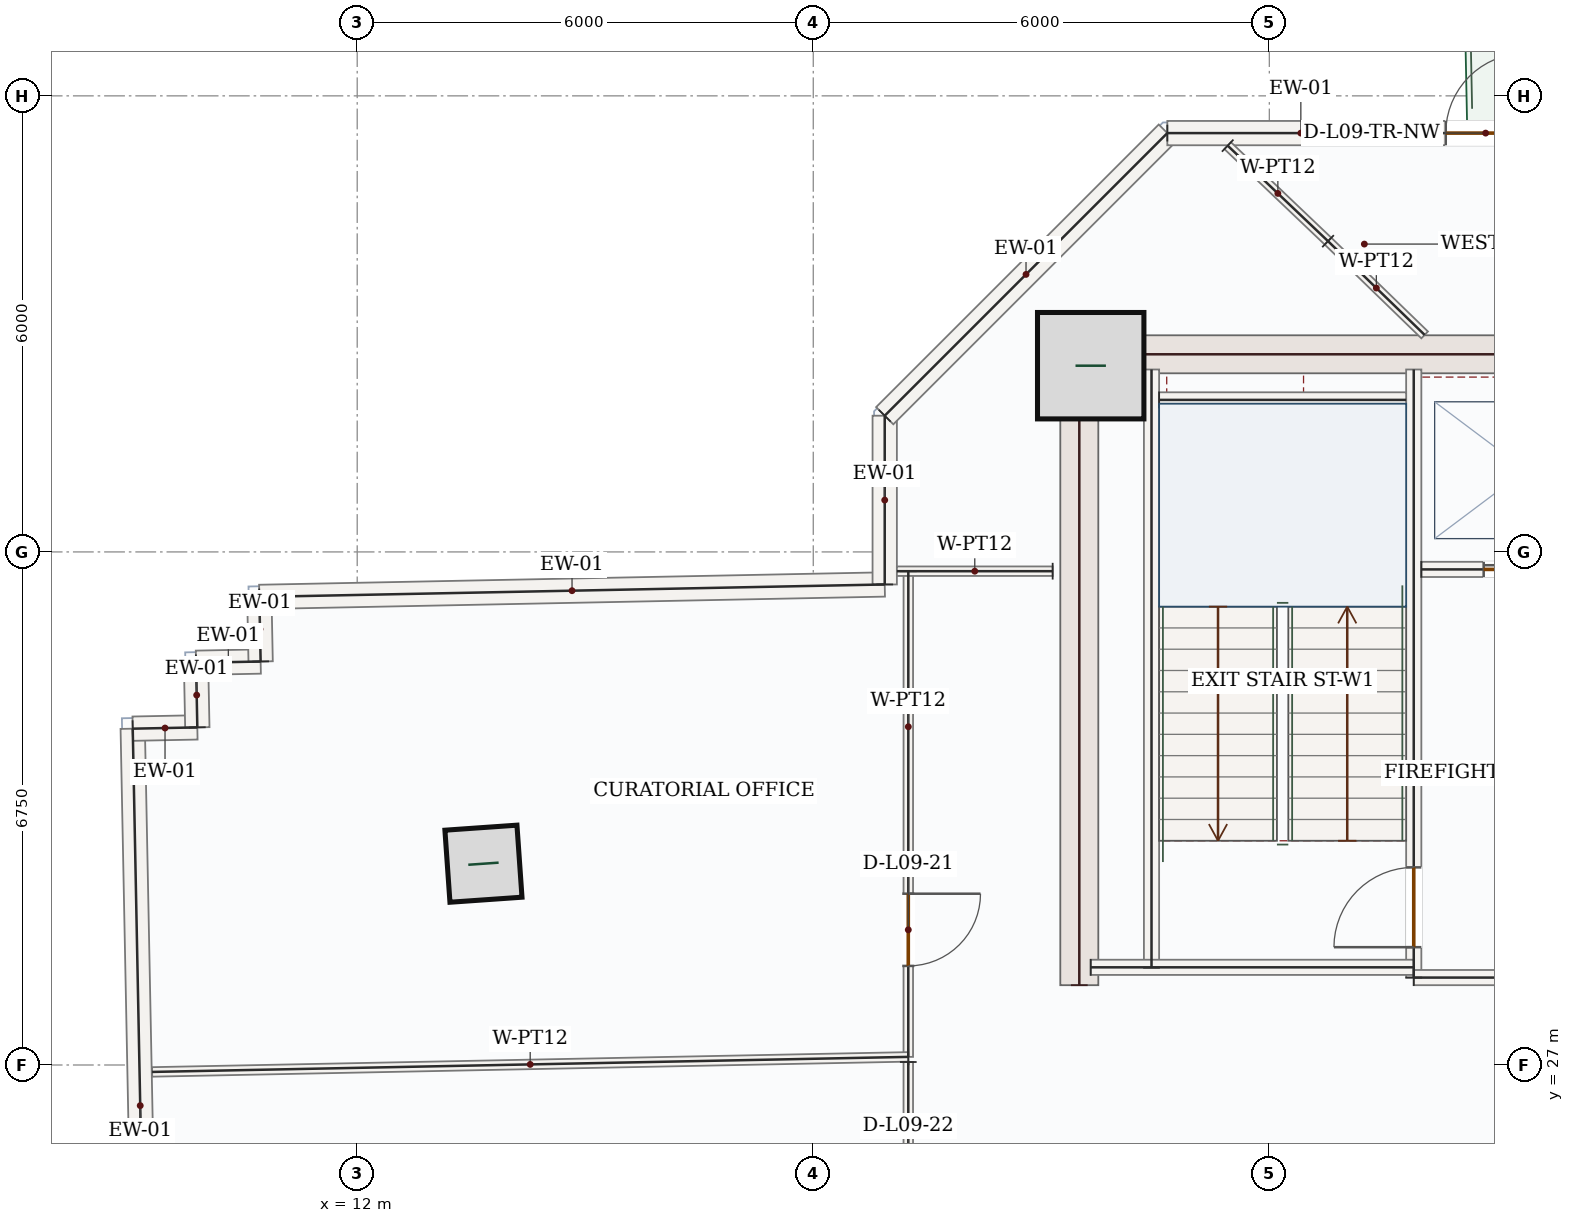
"""IFC4 building model, lengths in metres.
Left out: names, types, materials, properties, quantities, classifications, styles, units other than length and angle.
Written with IfcOpenShell. Run it as: python <this file> out.ifc"""

import sys

from ifc_helpers import new_model, si_unit, direction, frame, frame_2d, origin, origin_2d, place, context, subcontext, project, spatial, rectangle, hollow_rectangle, extrude, source, transform, mapped, element, fill, save


model = new_model("IFC4")
c1 = context("Model", 3, precision=1e-05, world=origin(), true_north=direction((0.0, 1.0)))
c2 = subcontext(c1, "Body", "Model", "MODEL_VIEW")
j1 = project(units=[si_unit("LENGTHUNIT", "METRE"), si_unit("PLANEANGLEUNIT", "RADIAN")], contexts=[c1])
p1 = place(None, origin())
s1 = spatial("IfcSite", under=j1, at=p1, CompositionType="ELEMENT")
p2 = place(p1, origin())
s2 = spatial("IfcBuilding", under=s1, at=p2, CompositionType="ELEMENT")
p3 = place(p2, frame((0.0, 0.0, 45.9)))
s3 = spatial("IfcBuildingStorey", under=s2, at=p3, CompositionType="ELEMENT", Elevation=45.9)
m1 = source(origin(), c2, "Body", "SweptSolid", [
    extrude(rectangle(XDim=8.55, YDim=0.5, at=frame_2d((4.275, 0.0))), origin(), (0.0, 0.0, 1.0), 3.95),
])
p4 = place(p3, frame((21.5, 28.05, 0.0), z_axis=(0.0, 0.0, 1.0), x_axis=(0.0, 1.0, 0.0)))
e1 = element("IfcWall", 1, at=p4, inside=s3, PredefinedType="SHEAR", context=c2, shape_type="MappedRepresentation", body=[
    mapped(m1, transform((0.0, 0.0, 0.0), x_axis=(1.0, 0.0, 0.0), y_axis=(0.0, 1.0, 0.0), z_axis=(0.0, 0.0, 1.0), scale=1.0)),
])
m2 = source(origin(), c2, "Body", "SweptSolid", [
    extrude(rectangle(XDim=7.0, YDim=0.5, at=frame_2d((3.5, 0.0))), origin(), (0.0, 0.0, 1.0), 3.95),
])
p5 = place(p3, frame((21.75, 36.35, 0.0), z_axis=(0.0, 0.0, 1.0), x_axis=(1.0, 0.0, 0.0)))
e2 = element("IfcWall", 2, at=p5, inside=s3, PredefinedType="SHEAR", context=c2, shape_type="MappedRepresentation", body=[
    mapped(m2, transform((0.0, 0.0, 0.0), x_axis=(1.0, 0.0, 0.0), y_axis=(0.0, 1.0, 0.0), z_axis=(0.0, 0.0, 1.0), scale=1.0)),
])
m3 = source(origin(), c2, "Body", "SweptSolid", [
    extrude(rectangle(XDim=1.4, YDim=1.4, at=origin_2d()), origin(), (0.0, 0.0, 1.0), 4.2),
])
p6 = place(p3, frame((21.65, 36.2, 0.0), z_axis=(0.0, 0.0, 1.0), x_axis=(1.0, 0.0, 0.0)))
e3 = element("IfcColumn", 3, at=p6, inside=s3, PredefinedType="COLUMN", context=c2, shape_type="MappedRepresentation", body=[
    mapped(m3, transform((0.0, 0.0, 0.0), x_axis=(1.0, 0.0, 0.0), y_axis=(0.0, 1.0, 0.0), z_axis=(0.0, 0.0, 1.0), scale=1.0)),
])
m4 = source(origin(), c2, "Body", "SweptSolid", [
    extrude(hollow_rectangle(XDim=0.95, YDim=0.95, WallThickness=0.05, at=origin_2d()), origin(), (0.0, 0.0, 1.0), 4.2),
])
p7 = place(p3, frame((13.661, 29.648, 0.0), z_axis=(0.0, 0.0, 1.0), x_axis=(0.99756405026, 0.069756473744, 0.0)))
e4 = element("IfcColumn", 4, at=p7, inside=s3, PredefinedType="COLUMN", context=c2, shape_type="MappedRepresentation", body=[
    mapped(m4, transform((0.0, 0.0, 0.0), x_axis=(1.0, 0.0, 0.0), y_axis=(0.0, 1.0, 0.0), z_axis=(0.0, 0.0, 1.0), scale=1.0)),
])
m5 = source(origin(), c2, "Body", "SweptSolid", [
    extrude(rectangle(XDim=9.92, YDim=0.32, at=frame_2d((4.96, 0.0))), origin(), (0.0, 0.0, 1.0), 3.95),
])
p8 = place(p3, frame((9.244, 21.507, 0.0), z_axis=(0.0, 0.0, 1.0), x_axis=(-0.019885787333, 0.99980225818, 0.0)))
e5 = element("IfcWall", 5, at=p8, inside=s3, PredefinedType="SOLIDWALL", context=c2, shape_type="MappedRepresentation", body=[
    mapped(m5, transform((0.0, 0.0, 0.0), x_axis=(1.0, 0.0, 0.0), y_axis=(0.0, 1.0, 0.0), z_axis=(0.0, 0.0, 1.0), scale=1.0)),
])
m6 = source(origin(), c2, "Body", "SweptSolid", [
    extrude(rectangle(XDim=0.85, YDim=0.32, at=frame_2d((0.425, 0.0))), origin(), (0.0, 0.0, 1.0), 3.95),
])
p9 = place(p3, frame((9.047, 31.425, 0.0), z_axis=(0.0, 0.0, 1.0), x_axis=(0.999803604205, 0.019817997326, 0.0)))
e6 = element("IfcWall", 6, at=p9, inside=s3, PredefinedType="SOLIDWALL", context=c2, shape_type="MappedRepresentation", body=[
    mapped(m6, transform((0.0, 0.0, 0.0), x_axis=(1.0, 0.0, 0.0), y_axis=(0.0, 1.0, 0.0), z_axis=(0.0, 0.0, 1.0), scale=1.0)),
])
m7 = source(origin(), c2, "Body", "SweptSolid", [
    extrude(rectangle(XDim=0.85, YDim=0.32, at=frame_2d((0.425, 0.0))), origin(), (0.0, 0.0, 1.0), 3.95),
])
p10 = place(p3, frame((9.896, 31.441, 0.0), z_axis=(0.0, 0.0, 1.0), x_axis=(-0.019812308004, 0.999803716962, 0.0)))
e7 = element("IfcWall", 7, at=p10, inside=s3, PredefinedType="SOLIDWALL", context=c2, shape_type="MappedRepresentation", body=[
    mapped(m7, transform((0.0, 0.0, 0.0), x_axis=(1.0, 0.0, 0.0), y_axis=(0.0, 1.0, 0.0), z_axis=(0.0, 0.0, 1.0), scale=1.0)),
])
for number, where, z_axis, x_axis in (
    (8, (9.88, 32.292, 0.0), (0.0, 0.0, 1.0), (1.0, 0.02, 0.0)),
    (9, (10.729, 32.308, 0.0), (0.0, 0.0, 1.0), (-0.02, 1.0, 0.0)),
):
    element("IfcWall", number, at=place(p3, frame(where, z_axis=z_axis, x_axis=x_axis)), inside=s3, PredefinedType="SOLIDWALL", context=c2, shape_type="MappedRepresentation", body=[
        mapped(m6, transform((0.0, 0.0, 0.0), x_axis=(1.0, 0.0, 0.0), y_axis=(0.0, 1.0, 0.0), z_axis=(0.0, 0.0, 1.0), scale=1.0)),
    ])
m8 = source(origin(), c2, "Body", "SweptSolid", [
    extrude(rectangle(XDim=8.229, YDim=0.32, at=frame_2d((4.115, 0.0))), origin(), (0.0, 0.0, 1.0), 3.95),
])
p11 = place(p3, frame((10.712, 33.158, 0.0), z_axis=(0.0, 0.0, 1.0), x_axis=(0.999801835372, 0.019907033577, 0.0)))
e10 = element("IfcWall", 10, at=p11, inside=s3, PredefinedType="SOLIDWALL", context=c2, shape_type="MappedRepresentation", body=[
    mapped(m8, transform((0.0, 0.0, 0.0), x_axis=(1.0, 0.0, 0.0), y_axis=(0.0, 1.0, 0.0), z_axis=(0.0, 0.0, 1.0), scale=1.0)),
])
m9 = source(origin(), c2, "Body", "SweptSolid", [
    extrude(rectangle(XDim=2.22, YDim=0.32, at=frame_2d((1.11, 0.0))), origin(), (0.0, 0.0, 1.0), 3.95),
])
p12 = place(p3, frame((18.94, 33.322, 0.0), z_axis=(0.0, 0.0, 1.0), x_axis=(0.0, 1.0, 0.0)))
e11 = element("IfcWall", 11, at=p12, inside=s3, PredefinedType="SOLIDWALL", context=c2, shape_type="MappedRepresentation", body=[
    mapped(m9, transform((0.0, 0.0, 0.0), x_axis=(1.0, 0.0, 0.0), y_axis=(0.0, 1.0, 0.0), z_axis=(0.0, 0.0, 1.0), scale=1.0)),
])
m10 = source(origin(), c2, "Body", "SweptSolid", [
    extrude(rectangle(XDim=5.258, YDim=0.32, at=frame_2d((2.629, 0.0))), origin(), (0.0, 0.0, 1.0), 3.95),
])
p13 = place(p3, frame((18.94, 35.542, 0.0), z_axis=(0.0, 0.0, 1.0), x_axis=(0.707106781187, 0.707106781187, 0.0)))
e12 = element("IfcWall", 12, at=p13, inside=s3, PredefinedType="SOLIDWALL", context=c2, shape_type="MappedRepresentation", body=[
    mapped(m10, transform((0.0, 0.0, 0.0), x_axis=(1.0, 0.0, 0.0), y_axis=(0.0, 1.0, 0.0), z_axis=(0.0, 0.0, 1.0), scale=1.0)),
])
p14 = place(p3, frame((22.658, 39.26, 0.0), z_axis=(0.0, 0.0, 1.0), x_axis=(1.0, 0.0, 0.0)))
e13 = element("IfcWall", 13, at=p14, inside=s3, PredefinedType="SOLIDWALL", context=c2, shape_type="SweptSolid", body=[
    extrude(rectangle(XDim=6.437, YDim=0.32, at=frame_2d((3.218, 0.0))), origin(), (0.0, 0.0, 1.0), 3.95),
])
p15 = place(p14, frame((3.663, 0.0, 0.0)))
e14 = element("IfcOpeningElement", 14, at=p15, cuts=e13, PredefinedType="OPENING", context=c2, shape_type="SweptSolid", body=[
    extrude(rectangle(XDim=1.05, YDim=2.15, at=frame_2d((0.525, 1.075))), frame((0.0, 0.17, 0.0), z_axis=(0.0, -1.0, 0.0), x_axis=(1.0, 0.0, 0.0)), (0.0, 0.0, 1.0), 0.34),
])
m11 = source(origin(), c2, "Body", "SweptSolid", [
    extrude(rectangle(XDim=7.87, YDim=0.2, at=frame_2d((3.935, 0.0))), origin(), (0.0, 0.0, 1.0), 3.95),
])
p16 = place(p3, frame((22.45, 28.28, 0.0), z_axis=(0.0, 0.0, 1.0), x_axis=(0.0, 1.0, 0.0)))
e15 = element("IfcWall", 15, at=p16, inside=s3, PredefinedType="SOLIDWALL", context=c2, shape_type="MappedRepresentation", body=[
    mapped(m11, transform((0.0, 0.0, 0.0), x_axis=(1.0, 0.0, 0.0), y_axis=(0.0, 1.0, 0.0), z_axis=(0.0, 0.0, 1.0), scale=1.0)),
])
p17 = place(p3, frame((25.9, 28.15, 0.0), z_axis=(0.0, 0.0, 1.0), x_axis=(0.0, 1.0, 0.0)))
e16 = element("IfcWall", 16, at=p17, inside=s3, PredefinedType="SOLIDWALL", context=c2, shape_type="SweptSolid", body=[
    extrude(rectangle(XDim=8.0, YDim=0.2, at=frame_2d((4.0, 0.0))), origin(), (0.0, 0.0, 1.0), 3.95),
])
p18 = place(p17, frame((0.4, 0.0, 0.0)))
e17 = element("IfcOpeningElement", 17, at=p18, cuts=e16, PredefinedType="OPENING", context=c2, shape_type="SweptSolid", body=[
    extrude(rectangle(XDim=1.05, YDim=2.15, at=frame_2d((0.525, 1.075))), frame((0.0, 0.11, 0.0), z_axis=(0.0, -1.0, 0.0), x_axis=(1.0, 0.0, 0.0)), (0.0, 0.0, 1.0), 0.22),
])
m12 = source(origin(), c2, "Body", "SweptSolid", [
    extrude(rectangle(XDim=4.25, YDim=0.2, at=frame_2d((2.125, 0.0))), origin(), (0.0, 0.0, 1.0), 3.95),
])
p19 = place(p3, frame((21.65, 28.285, 0.0), z_axis=(0.0, 0.0, 1.0), x_axis=(1.0, 0.0, 0.0)))
e18 = element("IfcWall", 18, at=p19, inside=s3, PredefinedType="SOLIDWALL", context=c2, shape_type="MappedRepresentation", body=[
    mapped(m12, transform((0.0, 0.0, 0.0), x_axis=(1.0, 0.0, 0.0), y_axis=(0.0, 1.0, 0.0), z_axis=(0.0, 0.0, 1.0), scale=1.0)),
])
m13 = source(origin(), c2, "Body", "SweptSolid", [
    extrude(rectangle(XDim=3.0, YDim=0.2, at=frame_2d((1.5, 0.0))), origin(), (0.0, 0.0, 1.0), 3.95),
])
p20 = place(p3, frame((25.9, 28.15, 0.0), z_axis=(0.0, 0.0, 1.0), x_axis=(1.0, 0.0, 0.0)))
e19 = element("IfcWall", 19, at=p20, inside=s3, PredefinedType="SOLIDWALL", context=c2, shape_type="MappedRepresentation", body=[
    mapped(m13, transform((0.0, 0.0, 0.0), x_axis=(1.0, 0.0, 0.0), y_axis=(0.0, 1.0, 0.0), z_axis=(0.0, 0.0, 1.0), scale=1.0)),
])
m14 = source(origin(), c2, "Body", "SweptSolid", [
    extrude(rectangle(XDim=3.25, YDim=0.2, at=frame_2d((1.625, 0.0))), origin(), (0.0, 0.0, 1.0), 3.95),
])
p21 = place(p3, frame((22.55, 35.75, 0.0), z_axis=(0.0, 0.0, 1.0), x_axis=(1.0, 0.0, 0.0)))
e20 = element("IfcWall", 20, at=p21, inside=s3, PredefinedType="SOLIDWALL", context=c2, shape_type="MappedRepresentation", body=[
    mapped(m14, transform((0.0, 0.0, 0.0), x_axis=(1.0, 0.0, 0.0), y_axis=(0.0, 1.0, 0.0), z_axis=(0.0, 0.0, 1.0), scale=1.0)),
])
p22 = place(p3, frame((26.0, 33.52, 0.0), z_axis=(0.0, 0.0, 1.0), x_axis=(1.0, 0.0, 0.0)))
e21 = element("IfcWall", 21, at=p22, inside=s3, PredefinedType="SOLIDWALL", context=c2, shape_type="SweptSolid", body=[
    extrude(rectangle(XDim=2.75, YDim=0.2, at=frame_2d((1.375, 0.0))), origin(), (0.0, 0.0, 1.0), 3.95),
])
p23 = place(p22, frame((0.82, 0.0, 0.0)))
e22 = element("IfcOpeningElement", 22, at=p23, cuts=e21, PredefinedType="OPENING", context=c2, shape_type="SweptSolid", body=[
    extrude(rectangle(XDim=1.1, YDim=2.15, at=frame_2d((0.55, 1.075))), frame((0.0, 0.11, 0.0), z_axis=(0.0, -1.0, 0.0), x_axis=(1.0, 0.0, 0.0)), (0.0, 0.0, 1.0), 0.22),
])
p24 = place(p3, frame((19.25, 33.496, 0.0), z_axis=(0.0, 0.0, 1.0), x_axis=(-7.6417545e-05, -0.99999999708, 0.0)))
e23 = element("IfcWall", 23, at=p24, inside=s3, PredefinedType="PARTITIONING", context=c2, shape_type="SweptSolid", body=[
    extrude(rectangle(XDim=6.39, YDim=0.125, at=frame_2d((3.195, 0.0))), origin(), (0.0, 0.0, 1.0), 3.95),
])
p25 = place(p24, frame((4.243, 0.0, 0.0)))
e24 = element("IfcOpeningElement", 24, at=p25, cuts=e23, PredefinedType="OPENING", context=c2, shape_type="SweptSolid", body=[
    extrude(rectangle(XDim=0.95, YDim=2.15, at=frame_2d((0.475, 1.075))), frame((0.0, 0.073, 0.0), z_axis=(0.0, -1.0, 0.0), x_axis=(1.0, 0.0, 0.0)), (0.0, 0.0, 1.0), 0.145),
])
m15 = source(origin(), c2, "Body", "SweptSolid", [
    extrude(rectangle(XDim=9.95, YDim=0.125, at=frame_2d((4.975, 0.0))), origin(), (0.0, 0.0, 1.0), 3.95),
])
p26 = place(p3, frame((19.25, 27.107, 0.0), z_axis=(0.0, 0.0, 1.0), x_axis=(-0.999802007469, -0.019898388379, 0.0)))
e25 = element("IfcWall", 25, at=p26, inside=s3, PredefinedType="PARTITIONING", context=c2, shape_type="MappedRepresentation", body=[
    mapped(m15, transform((0.0, 0.0, 0.0), x_axis=(1.0, 0.0, 0.0), y_axis=(0.0, 1.0, 0.0), z_axis=(0.0, 0.0, 1.0), scale=1.0)),
])
m16 = source(origin(), c2, "Body", "SweptSolid", [
    extrude(rectangle(XDim=1.823, YDim=0.125, at=frame_2d((0.911, 0.0))), origin(), (0.0, 0.0, 1.0), 3.95),
])
p27 = place(p3, frame((23.452, 39.095, 0.0), z_axis=(0.0, 0.0, 1.0), x_axis=(0.724303533388, -0.689481248129, 0.0)))
e26 = element("IfcWall", 26, at=p27, inside=s3, PredefinedType="PARTITIONING", context=c2, shape_type="MappedRepresentation", body=[
    mapped(m16, transform((0.0, 0.0, 0.0), x_axis=(1.0, 0.0, 0.0), y_axis=(0.0, 1.0, 0.0), z_axis=(0.0, 0.0, 1.0), scale=1.0)),
])
m17 = source(origin(), c2, "Body", "SweptSolid", [
    extrude(rectangle(XDim=1.771, YDim=0.125, at=frame_2d((0.885, 0.0))), origin(), (0.0, 0.0, 1.0), 3.95),
])
p28 = place(p3, frame((24.772, 37.838, 0.0), z_axis=(0.0, 0.0, 1.0), x_axis=(0.717777212316, -0.696272844135, 0.0)))
e27 = element("IfcWall", 27, at=p28, inside=s3, PredefinedType="PARTITIONING", context=c2, shape_type="MappedRepresentation", body=[
    mapped(m17, transform((0.0, 0.0, 0.0), x_axis=(1.0, 0.0, 0.0), y_axis=(0.0, 1.0, 0.0), z_axis=(0.0, 0.0, 1.0), scale=1.0)),
])
m18 = source(origin(), c2, "Body", "SweptSolid", [
    extrude(rectangle(XDim=2.049, YDim=0.125, at=frame_2d((1.025, 0.0))), origin(), (0.0, 0.0, 1.0), 3.95),
])
p29 = place(p3, frame((21.149, 33.497, 0.0), z_axis=(0.0, 0.0, 1.0), x_axis=(-0.999999992904, -0.000119132713, 0.0)))
e28 = element("IfcWall", 28, at=p29, inside=s3, PredefinedType="PARTITIONING", context=c2, shape_type="MappedRepresentation", body=[
    mapped(m18, transform((0.0, 0.0, 0.0), x_axis=(1.0, 0.0, 0.0), y_axis=(0.0, 1.0, 0.0), z_axis=(0.0, 0.0, 1.0), scale=1.0)),
])
p30 = place(p3, frame((19.25, 27.039, 0.0), z_axis=(0.0, 0.0, 1.0), x_axis=(0.0, -1.0, 0.0)))
e29 = element("IfcWall", 29, at=p30, inside=s3, PredefinedType="PARTITIONING", context=c2, shape_type="SweptSolid", body=[
    extrude(rectangle(XDim=6.533, YDim=0.125, at=frame_2d((3.267, 0.0))), origin(), (0.0, 0.0, 1.0), 3.95),
])
p31 = place(p30, frame((1.228, 0.0, 0.0)))
e30 = element("IfcOpeningElement", 30, at=p31, cuts=e29, PredefinedType="OPENING", context=c2, shape_type="SweptSolid", body=[
    extrude(rectangle(XDim=0.95, YDim=2.15, at=frame_2d((0.475, 1.075))), frame((0.0, 0.073, 0.0), z_axis=(0.0, -1.0, 0.0), x_axis=(1.0, 0.0, 0.0)), (0.0, 0.0, 1.0), 0.145),
])
m19 = source(origin(), c2, "Body", "SweptSolid", [
    extrude(rectangle(XDim=1.05, YDim=2.15, at=frame_2d((0.525, 1.075))), frame((0.0, 0.025, 0.0), z_axis=(0.0, -1.0, 0.0), x_axis=(1.0, 0.0, 0.0)), (0.0, 0.0, 1.0), 0.05),
])
p32 = place(p15, origin())
e31 = element("IfcDoor", 31, at=p32, inside=s3, OperationType="SINGLE_SWING_RIGHT", PredefinedType="DOOR", context=c2, shape_type="MappedRepresentation", body=[
    mapped(m19, transform((0.0, 0.0, 0.0), x_axis=(1.0, 0.0, 0.0), y_axis=(0.0, 1.0, 0.0), z_axis=(0.0, 0.0, 1.0), scale=1.0)),
])
fill(e14, e31)
p33 = place(p18, origin())
e32 = element("IfcDoor", 32, at=p33, inside=s3, OperationType="SINGLE_SWING_LEFT", PredefinedType="DOOR", context=c2, shape_type="MappedRepresentation", body=[
    mapped(m19, transform((0.0, 0.0, 0.0), x_axis=(1.0, 0.0, 0.0), y_axis=(0.0, 1.0, 0.0), z_axis=(0.0, 0.0, 1.0), scale=1.0)),
])
fill(e17, e32)
m20 = source(origin(), c2, "Body", "SweptSolid", [
    extrude(rectangle(XDim=1.1, YDim=2.15, at=frame_2d((0.55, 1.075))), frame((0.0, 0.025, 0.0), z_axis=(0.0, -1.0, 0.0), x_axis=(1.0, 0.0, 0.0)), (0.0, 0.0, 1.0), 0.05),
])
p34 = place(p23, origin())
e33 = element("IfcDoor", 33, at=p34, inside=s3, OperationType="DOUBLE_DOOR_SLIDING", PredefinedType="DOOR", context=c2, shape_type="MappedRepresentation", body=[
    mapped(m20, transform((0.0, 0.0, 0.0), x_axis=(1.0, 0.0, 0.0), y_axis=(0.0, 1.0, 0.0), z_axis=(0.0, 0.0, 1.0), scale=1.0)),
])
fill(e22, e33)
m21 = source(origin(), c2, "Body", "SweptSolid", [
    extrude(rectangle(XDim=0.95, YDim=2.15, at=frame_2d((0.475, 1.075))), frame((0.0, 0.025, 0.0), z_axis=(0.0, -1.0, 0.0), x_axis=(1.0, 0.0, 0.0)), (0.0, 0.0, 1.0), 0.05),
])
p35 = place(p25, origin())
e34 = element("IfcDoor", 34, at=p35, inside=s3, OperationType="SINGLE_SWING_LEFT", PredefinedType="DOOR", context=c2, shape_type="MappedRepresentation", body=[
    mapped(m21, transform((0.0, 0.0, 0.0), x_axis=(1.0, 0.0, 0.0), y_axis=(0.0, 1.0, 0.0), z_axis=(0.0, 0.0, 1.0), scale=1.0)),
])
fill(e24, e34)
save(model, sys.argv[1])
